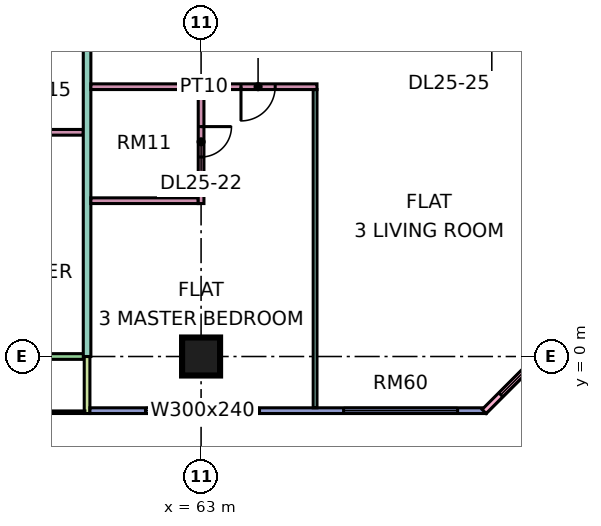
"""IFC4 building model, lengths in metres.
Left out: names, types, materials, properties, quantities, classifications, styles, units other than length and angle.
Written with IfcOpenShell. Run it as: python <this file> out.ifc"""

import sys

from ifc_helpers import new_model, si_unit, direction, frame, frame_2d, origin, origin_2d, place, context, subcontext, project, spatial, rectangle, extrude, element, fill, save


model = new_model("IFC4")
c1 = context("Model", 3, precision=1e-05, world=origin(), true_north=direction((0.0, 1.0)))
c2 = subcontext(c1, "Body", "Model", "MODEL_VIEW")
j1 = project(units=[si_unit("LENGTHUNIT", "METRE"), si_unit("PLANEANGLEUNIT", "RADIAN")], contexts=[c1])
p1 = place(None, origin())
s1 = spatial("IfcSite", under=j1, at=p1, CompositionType="ELEMENT")
p2 = place(p1, origin())
s2 = spatial("IfcBuilding", under=s1, at=p2, CompositionType="ELEMENT")
p3 = place(p2, frame((0.0, 0.0, 110.65)))
s3 = spatial("IfcBuildingStorey", under=s2, at=p3, CompositionType="ELEMENT", Elevation=110.65)
p4 = place(p3, frame((63.0, 0.0, 0.0), z_axis=(0.0, 0.0, 1.0), x_axis=(1.0, 0.0, 0.0)))
e1 = element("IfcColumn", 1, at=p4, inside=s3, PredefinedType="COLUMN", context=c2, shape_type="SweptSolid", body=[
    extrude(rectangle(XDim=1.0, YDim=1.0, at=origin_2d()), origin(), (0.0, 0.0, 1.0), 3.75),
])
p5 = place(p3, frame((48.075, 0.0, 0.0), z_axis=(0.0, 0.0, 1.0), x_axis=(1.0, 0.0, 0.0)))
e2 = element("IfcWall", 2, at=p5, inside=s3, PredefinedType="SOLIDWALL", context=c2, shape_type="SweptSolid", body=[
    extrude(rectangle(XDim=11.85, YDim=0.15, at=frame_2d((5.925, 0.0))), origin(), (0.0, 0.0, 1.0), 3.35),
])
p6 = place(p5, frame((0.562, 0.0, 0.45)))
e3 = element("IfcOpeningElement", 3, at=p6, cuts=e2, PredefinedType="OPENING", context=c2, shape_type="SweptSolid", body=[
    extrude(rectangle(XDim=1.8, YDim=2.4, at=frame_2d((0.9, 1.2))), frame((0.0, 0.085, 0.0), z_axis=(0.0, -1.0, 0.0), x_axis=(1.0, 0.0, 0.0)), (0.0, 0.0, 1.0), 0.17),
])
p7 = place(p5, frame((3.525, 0.0, 0.0)))
e4 = element("IfcOpeningElement", 4, at=p7, cuts=e2, PredefinedType="OPENING", context=c2, shape_type="SweptSolid", body=[
    extrude(rectangle(XDim=1.2, YDim=2.4, at=frame_2d((0.6, 1.2))), frame((0.0, 0.085, 0.0), z_axis=(0.0, -1.0, 0.0), x_axis=(1.0, 0.0, 0.0)), (0.0, 0.0, 1.0), 0.17),
])
p8 = place(p5, frame((7.688, 0.0, 0.45)))
e5 = element("IfcOpeningElement", 5, at=p8, cuts=e2, PredefinedType="OPENING", context=c2, shape_type="SweptSolid", body=[
    extrude(rectangle(XDim=3.0, YDim=2.4, at=frame_2d((1.5, 1.2))), frame((0.0, 0.085, 0.0), z_axis=(0.0, -1.0, 0.0), x_axis=(1.0, 0.0, 0.0)), (0.0, 0.0, 1.0), 0.17),
])
p9 = place(p3, frame((60.0, -1.5, 0.0), z_axis=(0.0, 0.0, 1.0), x_axis=(0.0, 1.0, 0.0)))
e6 = element("IfcWall", 6, at=p9, inside=s3, PredefinedType="SOLIDWALL", context=c2, shape_type="SweptSolid", body=[
    extrude(rectangle(XDim=1.5, YDim=0.15, at=frame_2d((0.75, 0.0))), origin(), (0.0, 0.0, 1.0), 3.35),
])
p10 = place(p3, frame((60.075, -1.425, 0.0), z_axis=(0.0, 0.0, 1.0), x_axis=(1.0, 0.0, 0.0)))
e7 = element("IfcWall", 7, at=p10, inside=s3, PredefinedType="SOLIDWALL", context=c2, shape_type="SweptSolid", body=[
    extrude(rectangle(XDim=10.425, YDim=0.15, at=frame_2d((5.212, 0.0))), origin(), (0.0, 0.0, 1.0), 3.35),
])
p11 = place(p10, frame((1.462, 0.0, 0.45)))
e8 = element("IfcOpeningElement", 8, at=p11, cuts=e7, PredefinedType="OPENING", context=c2, shape_type="SweptSolid", body=[
    extrude(rectangle(XDim=3.0, YDim=2.4, at=frame_2d((1.5, 1.2))), frame((0.0, 0.085, 0.0), z_axis=(0.0, -1.0, 0.0), x_axis=(1.0, 0.0, 0.0)), (0.0, 0.0, 1.0), 0.17),
])
p12 = place(p10, frame((6.675, 0.0, 0.45)))
e9 = element("IfcOpeningElement", 9, at=p12, cuts=e7, PredefinedType="OPENING", context=c2, shape_type="SweptSolid", body=[
    extrude(rectangle(XDim=3.0, YDim=2.4, at=frame_2d((1.5, 1.2))), frame((0.0, 0.085, 0.0), z_axis=(0.0, -1.0, 0.0), x_axis=(1.0, 0.0, 0.0)), (0.0, 0.0, 1.0), 0.17),
])
p13 = place(p3, frame((70.447, -1.447, 0.0), z_axis=(0.0, 0.0, 1.0), x_axis=(0.707106781187, 0.707106781187, 0.0)))
e10 = element("IfcWall", 10, at=p13, inside=s3, PredefinedType="SOLIDWALL", context=c2, shape_type="SweptSolid", body=[
    extrude(rectangle(XDim=4.243, YDim=0.15, at=frame_2d((2.121, 0.0))), origin(), (0.0, 0.0, 1.0), 3.35),
])
p14 = place(p13, frame((0.621, 0.0, 0.45)))
e11 = element("IfcOpeningElement", 11, at=p14, cuts=e10, PredefinedType="OPENING", context=c2, shape_type="SweptSolid", body=[
    extrude(rectangle(XDim=3.0, YDim=2.4, at=frame_2d((1.5, 1.2))), frame((0.0, 0.085, 0.0), z_axis=(0.0, -1.0, 0.0), x_axis=(1.0, 0.0, 0.0)), (0.0, 0.0, 1.0), 0.17),
])
p15 = place(p3, frame((50.95, 5.9, 0.0), z_axis=(0.0, 0.0, 1.0), x_axis=(1.0, 0.0, 0.0)))
e12 = element("IfcWall", 12, at=p15, inside=s3, PredefinedType="PARTITIONING", context=c2, shape_type="SweptSolid", body=[
    extrude(rectangle(XDim=8.95, YDim=0.15, at=frame_2d((4.475, 0.0))), origin(), (0.0, 0.0, 1.0), 3.35),
])
p16 = place(p15, frame((1.1, 0.0, 0.0)))
e13 = element("IfcOpeningElement", 13, at=p16, cuts=e12, PredefinedType="OPENING", context=c2, shape_type="SweptSolid", body=[
    extrude(rectangle(XDim=0.9, YDim=2.1, at=frame_2d((0.45, 1.05))), frame((0.0, 0.085, 0.0), z_axis=(0.0, -1.0, 0.0), x_axis=(1.0, 0.0, 0.0)), (0.0, 0.0, 1.0), 0.17),
])
p17 = place(p15, frame((7.1, 0.0, 0.0)))
e14 = element("IfcOpeningElement", 14, at=p17, cuts=e12, PredefinedType="OPENING", context=c2, shape_type="SweptSolid", body=[
    extrude(rectangle(XDim=0.9, YDim=2.1, at=frame_2d((0.45, 1.05))), frame((0.0, 0.085, 0.0), z_axis=(0.0, -1.0, 0.0), x_axis=(1.0, 0.0, 0.0)), (0.0, 0.0, 1.0), 0.17),
])
p18 = place(p3, frame((60.0, 0.0, 0.0), z_axis=(0.0, 0.0, 1.0), x_axis=(0.0, 1.0, 0.0)))
e15 = element("IfcWall", 15, at=p18, inside=s3, PredefinedType="PARTITIONING", context=c2, shape_type="SweptSolid", body=[
    extrude(rectangle(XDim=12.4, YDim=0.2, at=frame_2d((6.2, 0.0))), origin(), (0.0, 0.0, 1.0), 3.35),
])
p19 = place(p3, frame((60.1, 4.1, 0.0), z_axis=(0.0, 0.0, 1.0), x_axis=(1.0, 0.0, 0.0)))
e16 = element("IfcWall", 16, at=p19, inside=s3, PredefinedType="PARTITIONING", context=c2, shape_type="SweptSolid", body=[
    extrude(rectangle(XDim=2.825, YDim=0.15, at=frame_2d((1.413, 0.0))), origin(), (0.0, 0.0, 1.0), 3.35),
])
p20 = place(p3, frame((60.1, 7.1, 0.0), z_axis=(0.0, 0.0, 1.0), x_axis=(1.0, 0.0, 0.0)))
e17 = element("IfcWall", 17, at=p20, inside=s3, PredefinedType="PARTITIONING", context=c2, shape_type="SweptSolid", body=[
    extrude(rectangle(XDim=5.95, YDim=0.15, at=frame_2d((2.975, 0.0))), origin(), (0.0, 0.0, 1.0), 3.35),
])
p21 = place(p20, frame((3.95, 0.0, 0.0)))
e18 = element("IfcOpeningElement", 18, at=p21, cuts=e17, PredefinedType="OPENING", context=c2, shape_type="SweptSolid", body=[
    extrude(rectangle(XDim=0.9, YDim=2.1, at=frame_2d((0.45, 1.05))), frame((0.0, 0.085, 0.0), z_axis=(0.0, -1.0, 0.0), x_axis=(1.0, 0.0, 0.0)), (0.0, 0.0, 1.0), 0.17),
])
p22 = place(p3, frame((63.0, 4.025, 0.0), z_axis=(0.0, 0.0, 1.0), x_axis=(0.0, 1.0, 0.0)))
e19 = element("IfcWall", 19, at=p22, inside=s3, PredefinedType="PARTITIONING", context=c2, shape_type="SweptSolid", body=[
    extrude(rectangle(XDim=3.0, YDim=0.15, at=frame_2d((1.5, 0.0))), origin(), (0.0, 0.0, 1.0), 3.35),
])
p23 = place(p22, frame((1.225, 0.0, 0.0)))
e20 = element("IfcOpeningElement", 20, at=p23, cuts=e19, PredefinedType="OPENING", context=c2, shape_type="SweptSolid", body=[
    extrude(rectangle(XDim=0.8, YDim=2.1, at=frame_2d((0.4, 1.05))), frame((0.0, 0.085, 0.0), z_axis=(0.0, -1.0, 0.0), x_axis=(1.0, 0.0, 0.0)), (0.0, 0.0, 1.0), 0.17),
])
p24 = place(p3, frame((66.0, -1.35, 0.0), z_axis=(0.0, 0.0, 1.0), x_axis=(0.0, 1.0, 0.0)))
e21 = element("IfcWall", 21, at=p24, inside=s3, PredefinedType="PARTITIONING", context=c2, shape_type="SweptSolid", body=[
    extrude(rectangle(XDim=8.375, YDim=0.1, at=frame_2d((4.188, 0.0))), origin(), (0.0, 0.0, 1.0), 3.35),
])
p25 = place(p11, origin())
e22 = element("IfcWindow", 22, at=p25, inside=s3, PartitioningType="SINGLE_PANEL", PredefinedType="WINDOW", context=c2, shape_type="SweptSolid", body=[
    extrude(rectangle(XDim=3.0, YDim=2.4, at=frame_2d((1.5, 1.2))), frame((0.0, 0.03, 0.0), z_axis=(0.0, -1.0, 0.0), x_axis=(1.0, 0.0, 0.0)), (0.0, 0.0, 1.0), 0.06),
])
fill(e8, e22)
p26 = place(p12, origin())
e23 = element("IfcWindow", 23, at=p26, inside=s3, PartitioningType="SINGLE_PANEL", PredefinedType="WINDOW", context=c2, shape_type="SweptSolid", body=[
    extrude(rectangle(XDim=3.0, YDim=2.4, at=frame_2d((1.5, 1.2))), frame((0.0, 0.03, 0.0), z_axis=(0.0, -1.0, 0.0), x_axis=(1.0, 0.0, 0.0)), (0.0, 0.0, 1.0), 0.06),
])
fill(e9, e23)
p27 = place(p14, origin())
e24 = element("IfcWindow", 24, at=p27, inside=s3, PartitioningType="SINGLE_PANEL", PredefinedType="WINDOW", context=c2, shape_type="SweptSolid", body=[
    extrude(rectangle(XDim=3.0, YDim=2.4, at=frame_2d((1.5, 1.2))), frame((0.0, 0.03, 0.0), z_axis=(0.0, -1.0, 0.0), x_axis=(1.0, 0.0, 0.0)), (0.0, 0.0, 1.0), 0.06),
])
fill(e11, e24)
p28 = place(p21, frame((0.9, 0.0, 0.0), z_axis=(0.0, 0.0, 1.0), x_axis=(-1.0, 0.0, 0.0)))
e25 = element("IfcDoor", 25, at=p28, inside=s3, OperationType="SINGLE_SWING_LEFT", PredefinedType="DOOR", context=c2, shape_type="SweptSolid", body=[
    extrude(rectangle(XDim=0.9, YDim=2.1, at=frame_2d((0.45, 1.05))), frame((0.0, 0.025, 0.0), z_axis=(0.0, -1.0, 0.0), x_axis=(1.0, 0.0, 0.0)), (0.0, 0.0, 1.0), 0.05),
])
fill(e18, e25)
p29 = place(p23, origin())
e26 = element("IfcDoor", 26, at=p29, inside=s3, OperationType="SINGLE_SWING_RIGHT", PredefinedType="DOOR", context=c2, shape_type="SweptSolid", body=[
    extrude(rectangle(XDim=0.8, YDim=2.1, at=frame_2d((0.4, 1.05))), frame((0.0, 0.025, 0.0), z_axis=(0.0, -1.0, 0.0), x_axis=(1.0, 0.0, 0.0)), (0.0, 0.0, 1.0), 0.05),
])
fill(e20, e26)
save(model, sys.argv[1])
